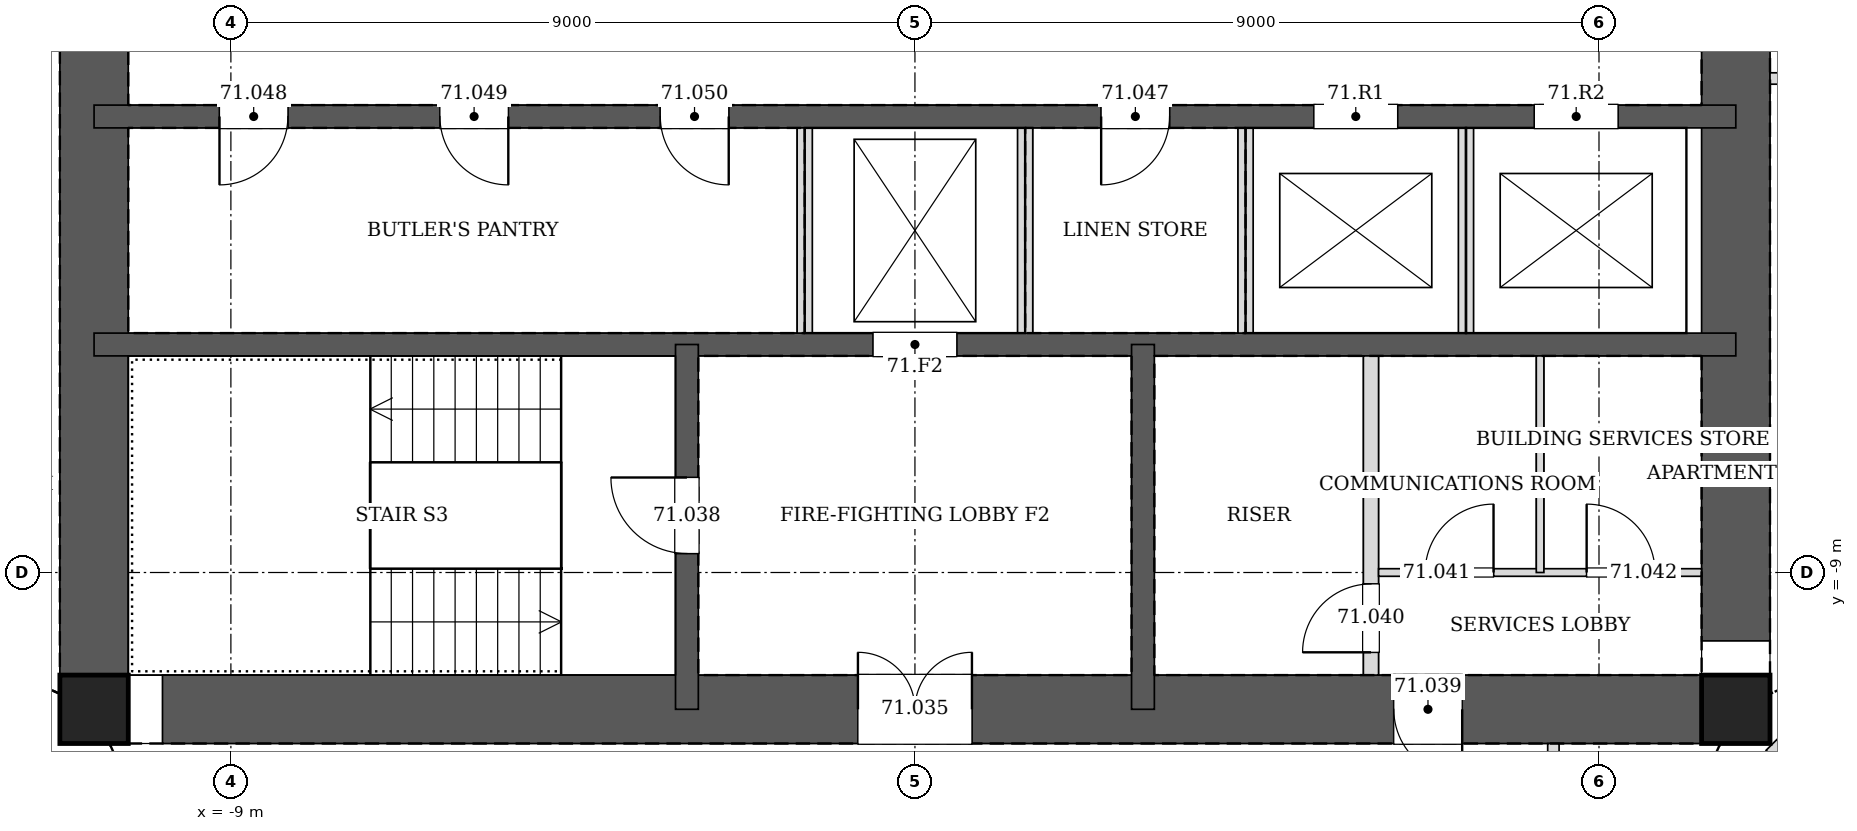
"""IFC4 building model, lengths in metres.
Left out: names, types, materials, properties, quantities, classifications, styles, units other than length and angle.
Written with IfcOpenShell. Run it as: python <this file> out.ifc"""

import sys

from ifc_helpers import new_model, si_unit, direction, frame, frame_2d, origin, origin_2d, place, context, subcontext, project, spatial, rectangle, hollow_rectangle, extrude, element, fill, save


model = new_model("IFC4")
c1 = context("Model", 3, precision=1e-05, world=origin(), true_north=direction((0.0, 1.0)))
c2 = subcontext(c1, "Body", "Model", "MODEL_VIEW")
j1 = project(units=[si_unit("LENGTHUNIT", "METRE"), si_unit("PLANEANGLEUNIT", "RADIAN")], contexts=[c1])
p1 = place(None, origin())
s1 = spatial("IfcSite", under=j1, at=p1, CompositionType="ELEMENT")
p2 = place(p1, origin())
s2 = spatial("IfcBuilding", under=s1, at=p2, CompositionType="ELEMENT")
p3 = place(p2, frame((0.0, 0.0, 291.2)))
s3 = spatial("IfcBuildingStorey", under=s2, at=p3, CompositionType="ELEMENT", Elevation=291.2)
for number, where, z_axis, x_axis in (
    (1, (-10.8, -10.8, 0.0), (0.0, 0.0, 1.0), (1.0, 0.0, 0.0)),
    (2, (10.8, -10.8, 0.0), (0.0, 0.0, 1.0), (1.0, 0.0, 0.0)),
):
    element("IfcColumn", number, at=place(p3, frame(where, z_axis=z_axis, x_axis=x_axis)), inside=s3, PredefinedType="COLUMN", context=c2, shape_type="SweptSolid", body=[
        extrude(hollow_rectangle(XDim=0.9, YDim=0.9, WallThickness=0.04, at=origin_2d()), origin(), (0.0, 0.0, 1.0), 3.4),
    ])
p4 = place(p3, frame((-10.8, -10.8, 0.0), z_axis=(0.0, 0.0, 1.0), x_axis=(1.0, 0.0, 0.0)))
e3 = element("IfcWall", 3, at=p4, inside=s3, PredefinedType="SOLIDWALL", context=c2, shape_type="SweptSolid", body=[
    extrude(rectangle(XDim=21.6, YDim=0.9, at=frame_2d((10.8, 0.0))), origin(), (0.0, 0.0, 1.0), 3.4),
])
p5 = place(p4, frame((10.05, 0.0, 0.0)))
e4 = element("IfcOpeningElement", 4, at=p5, cuts=e3, PredefinedType="OPENING", context=c2, shape_type="SweptSolid", body=[
    extrude(rectangle(XDim=1.5, YDim=2.1, at=frame_2d((0.75, 1.05))), frame((0.0, 0.46, 0.0), z_axis=(0.0, -1.0, 0.0), x_axis=(1.0, 0.0, 0.0)), (0.0, 0.0, 1.0), 0.92),
])
p6 = place(p4, frame((17.1, 0.0, 0.0)))
e5 = element("IfcOpeningElement", 5, at=p6, cuts=e3, PredefinedType="OPENING", context=c2, shape_type="SweptSolid", body=[
    extrude(rectangle(XDim=0.9, YDim=2.1, at=frame_2d((0.45, 1.05))), frame((0.0, 0.46, 0.0), z_axis=(0.0, -1.0, 0.0), x_axis=(1.0, 0.0, 0.0)), (0.0, 0.0, 1.0), 0.92),
])
p7 = place(p3, frame((10.8, -10.8, 0.0), z_axis=(0.0, 0.0, 1.0), x_axis=(0.0, 1.0, 0.0)))
e6 = element("IfcWall", 6, at=p7, inside=s3, PredefinedType="SOLIDWALL", context=c2, shape_type="SweptSolid", body=[
    extrude(rectangle(XDim=21.6, YDim=0.9, at=frame_2d((10.8, 0.0))), origin(), (0.0, 0.0, 1.0), 3.4),
])
p8 = place(p7, frame((11.7, 0.0, 0.0)))
e7 = element("IfcOpeningElement", 7, at=p8, cuts=e6, PredefinedType="OPENING", context=c2, shape_type="SweptSolid", body=[
    extrude(rectangle(XDim=1.2, YDim=2.1, at=frame_2d((0.6, 1.05))), frame((0.0, 0.46, 0.0), z_axis=(0.0, -1.0, 0.0), x_axis=(1.0, 0.0, 0.0)), (0.0, 0.0, 1.0), 0.92),
])
p9 = place(p7, frame((8.7, 0.0, 0.0)))
e8 = element("IfcOpeningElement", 8, at=p9, cuts=e6, PredefinedType="OPENING", context=c2, shape_type="SweptSolid", body=[
    extrude(rectangle(XDim=1.2, YDim=2.1, at=frame_2d((0.6, 1.05))), frame((0.0, 0.46, 0.0), z_axis=(0.0, -1.0, 0.0), x_axis=(1.0, 0.0, 0.0)), (0.0, 0.0, 1.0), 0.92),
])
p10 = place(p3, frame((-10.8, 10.8, 0.0), z_axis=(0.0, 0.0, 1.0), x_axis=(0.0, -1.0, 0.0)))
e9 = element("IfcWall", 9, at=p10, inside=s3, PredefinedType="SOLIDWALL", context=c2, shape_type="SweptSolid", body=[
    extrude(rectangle(XDim=21.6, YDim=0.9, at=frame_2d((10.8, 0.0))), origin(), (0.0, 0.0, 1.0), 3.4),
])
p11 = place(p10, frame((8.7, 0.0, 0.0)))
e10 = element("IfcOpeningElement", 10, at=p11, cuts=e9, PredefinedType="OPENING", context=c2, shape_type="SweptSolid", body=[
    extrude(rectangle(XDim=1.2, YDim=2.1, at=frame_2d((0.6, 1.05))), frame((0.0, 0.46, 0.0), z_axis=(0.0, -1.0, 0.0), x_axis=(1.0, 0.0, 0.0)), (0.0, 0.0, 1.0), 0.92),
])
p12 = place(p10, frame((11.7, 0.0, 0.0)))
e11 = element("IfcOpeningElement", 11, at=p12, cuts=e9, PredefinedType="OPENING", context=c2, shape_type="SweptSolid", body=[
    extrude(rectangle(XDim=1.2, YDim=2.1, at=frame_2d((0.6, 1.05))), frame((0.0, 0.46, 0.0), z_axis=(0.0, -1.0, 0.0), x_axis=(1.0, 0.0, 0.0)), (0.0, 0.0, 1.0), 0.92),
])
p13 = place(p3, frame((-10.8, -3.0, 0.0), z_axis=(0.0, 0.0, 1.0), x_axis=(1.0, 0.0, 0.0)))
e12 = element("IfcWall", 12, at=p13, inside=s3, PredefinedType="SOLIDWALL", context=c2, shape_type="SweptSolid", body=[
    extrude(rectangle(XDim=21.6, YDim=0.3, at=frame_2d((10.8, 0.0))), origin(), (0.0, 0.0, 1.0), 3.4),
])
p14 = place(p13, frame((13.25, 0.0, 0.0)))
e13 = element("IfcOpeningElement", 13, at=p14, cuts=e12, PredefinedType="OPENING", context=c2, shape_type="SweptSolid", body=[
    extrude(rectangle(XDim=0.9, YDim=2.1, at=frame_2d((0.45, 1.05))), frame((0.0, 0.16, 0.0), z_axis=(0.0, -1.0, 0.0), x_axis=(1.0, 0.0, 0.0)), (0.0, 0.0, 1.0), 0.32),
])
p15 = place(p13, frame((1.65, 0.0, 0.0)))
e14 = element("IfcOpeningElement", 14, at=p15, cuts=e12, PredefinedType="OPENING", context=c2, shape_type="SweptSolid", body=[
    extrude(rectangle(XDim=0.9, YDim=2.1, at=frame_2d((0.45, 1.05))), frame((0.0, 0.16, 0.0), z_axis=(0.0, -1.0, 0.0), x_axis=(1.0, 0.0, 0.0)), (0.0, 0.0, 1.0), 0.32),
])
p16 = place(p13, frame((4.55, 0.0, 0.0)))
e15 = element("IfcOpeningElement", 15, at=p16, cuts=e12, PredefinedType="OPENING", context=c2, shape_type="SweptSolid", body=[
    extrude(rectangle(XDim=0.9, YDim=2.1, at=frame_2d((0.45, 1.05))), frame((0.0, 0.16, 0.0), z_axis=(0.0, -1.0, 0.0), x_axis=(1.0, 0.0, 0.0)), (0.0, 0.0, 1.0), 0.32),
])
p17 = place(p13, frame((7.45, 0.0, 0.0)))
e16 = element("IfcOpeningElement", 16, at=p17, cuts=e12, PredefinedType="OPENING", context=c2, shape_type="SweptSolid", body=[
    extrude(rectangle(XDim=0.9, YDim=2.1, at=frame_2d((0.45, 1.05))), frame((0.0, 0.16, 0.0), z_axis=(0.0, -1.0, 0.0), x_axis=(1.0, 0.0, 0.0)), (0.0, 0.0, 1.0), 0.32),
])
p18 = place(p13, frame((16.05, 0.0, 0.0)))
e17 = element("IfcOpeningElement", 17, at=p18, cuts=e12, PredefinedType="OPENING", context=c2, shape_type="SweptSolid", body=[
    extrude(rectangle(XDim=1.1, YDim=2.1, at=frame_2d((0.55, 1.05))), frame((0.0, 0.16, 0.0), z_axis=(0.0, -1.0, 0.0), x_axis=(1.0, 0.0, 0.0)), (0.0, 0.0, 1.0), 0.32),
])
p19 = place(p13, frame((18.95, 0.0, 0.0)))
e18 = element("IfcOpeningElement", 18, at=p19, cuts=e12, PredefinedType="OPENING", context=c2, shape_type="SweptSolid", body=[
    extrude(rectangle(XDim=1.1, YDim=2.1, at=frame_2d((0.55, 1.05))), frame((0.0, 0.16, 0.0), z_axis=(0.0, -1.0, 0.0), x_axis=(1.0, 0.0, 0.0)), (0.0, 0.0, 1.0), 0.32),
])
p20 = place(p3, frame((-10.8, -6.0, 0.0), z_axis=(0.0, 0.0, 1.0), x_axis=(1.0, 0.0, 0.0)))
e19 = element("IfcWall", 19, at=p20, inside=s3, PredefinedType="SOLIDWALL", context=c2, shape_type="SweptSolid", body=[
    extrude(rectangle(XDim=21.6, YDim=0.3, at=frame_2d((10.8, 0.0))), origin(), (0.0, 0.0, 1.0), 3.4),
])
p21 = place(p20, frame((10.25, 0.0, 0.0)))
e20 = element("IfcOpeningElement", 20, at=p21, cuts=e19, PredefinedType="OPENING", context=c2, shape_type="SweptSolid", body=[
    extrude(rectangle(XDim=1.1, YDim=2.1, at=frame_2d((0.55, 1.05))), frame((0.0, 0.16, 0.0), z_axis=(0.0, -1.0, 0.0), x_axis=(1.0, 0.0, 0.0)), (0.0, 0.0, 1.0), 0.32),
])
p22 = place(p3, frame((-3.0, -6.0, 0.0), z_axis=(0.0, 0.0, 1.0), x_axis=(0.0, -1.0, 0.0)))
e21 = element("IfcWall", 21, at=p22, inside=s3, PredefinedType="SOLIDWALL", context=c2, shape_type="SweptSolid", body=[
    extrude(rectangle(XDim=4.8, YDim=0.3, at=frame_2d((2.4, 0.0))), origin(), (0.0, 0.0, 1.0), 3.4),
])
p23 = place(p22, frame((1.75, 0.0, 0.0)))
e22 = element("IfcOpeningElement", 22, at=p23, cuts=e21, PredefinedType="OPENING", context=c2, shape_type="SweptSolid", body=[
    extrude(rectangle(XDim=1.0, YDim=2.1, at=frame_2d((0.5, 1.05))), frame((0.0, 0.16, 0.0), z_axis=(0.0, -1.0, 0.0), x_axis=(1.0, 0.0, 0.0)), (0.0, 0.0, 1.0), 0.32),
])
p24 = place(p3, frame((3.0, -6.0, 0.0), z_axis=(0.0, 0.0, 1.0), x_axis=(0.0, -1.0, 0.0)))
e23 = element("IfcWall", 23, at=p24, inside=s3, PredefinedType="SOLIDWALL", context=c2, shape_type="SweptSolid", body=[
    extrude(rectangle(XDim=4.8, YDim=0.3, at=frame_2d((2.4, 0.0))), origin(), (0.0, 0.0, 1.0), 3.4),
])
p25 = place(p3, frame((11.25, -2.5, 0.0), z_axis=(0.0, 0.0, 1.0), x_axis=(1.0, 0.0, 0.0)))
e24 = element("IfcWall", 24, at=p25, inside=s3, PredefinedType="PARTITIONING", context=c2, shape_type="SweptSolid", body=[
    extrude(rectangle(XDim=1.65, YDim=0.15, at=frame_2d((0.825, 0.0))), origin(), (0.0, 0.0, 1.0), 3.2),
])
p26 = place(p25, frame((0.35, 0.0, 0.0)))
e25 = element("IfcOpeningElement", 25, at=p26, cuts=e24, PredefinedType="OPENING", context=c2, shape_type="SweptSolid", body=[
    extrude(rectangle(XDim=0.95, YDim=2.1, at=frame_2d((0.475, 1.05))), frame((0.0, 0.085, 0.0), z_axis=(0.0, -1.0, 0.0), x_axis=(1.0, 0.0, 0.0)), (0.0, 0.0, 1.0), 0.17),
])
p27 = place(p3, frame((8.4, -12.9, 0.0), z_axis=(0.0, 0.0, 1.0), x_axis=(0.0, 1.0, 0.0)))
e26 = element("IfcWall", 26, at=p27, inside=s3, PredefinedType="PARTITIONING", context=c2, shape_type="SweptSolid", body=[
    extrude(rectangle(XDim=1.65, YDim=0.15, at=frame_2d((0.825, 0.0))), origin(), (0.0, 0.0, 1.0), 3.2),
])
p28 = place(p3, frame((12.901, -12.901, 0.0), z_axis=(0.0, 0.0, 1.0), x_axis=(-0.707106781187, 0.707106781187, 0.0)))
e27 = element("IfcWall", 27, at=p28, inside=s3, PredefinedType="PARTITIONING", context=c2, shape_type="SweptSolid", body=[
    extrude(rectangle(XDim=2.308, YDim=0.2, at=frame_2d((1.154, 0.0))), origin(), (0.0, 0.0, 1.0), 2.591),
])
for number, where, z_axis, x_axis in (
    (28, (-1.45, -5.85, 0.0), (0.0, 0.0, 1.0), (0.0, 1.0, 0.0)),
    (29, (1.45, -5.85, 0.0), (0.0, 0.0, 1.0), (0.0, 1.0, 0.0)),
    (30, (4.35, -5.85, 0.0), (0.0, 0.0, 1.0), (0.0, 1.0, 0.0)),
):
    element("IfcWall", number, at=place(p3, frame(where, z_axis=z_axis, x_axis=x_axis)), inside=s3, PredefinedType="PARTITIONING", context=c2, shape_type="SweptSolid", body=[
        extrude(rectangle(XDim=2.7, YDim=0.2, at=frame_2d((1.35, 0.0))), origin(), (0.0, 0.0, 1.0), 3.2),
    ])
p29 = place(p3, frame((7.25, -5.85, 0.0), z_axis=(0.0, 0.0, 1.0), x_axis=(0.0, 1.0, 0.0)))
e31 = element("IfcWall", 31, at=p29, inside=s3, PredefinedType="PARTITIONING", context=c2, shape_type="SweptSolid", body=[
    extrude(rectangle(XDim=2.7, YDim=0.2, at=frame_2d((1.35, 0.0))), origin(), (0.0, 0.0, 1.0), 3.4),
])
p30 = place(p3, frame((6.0, -10.35, 0.0), z_axis=(0.0, 0.0, 1.0), x_axis=(0.0, 1.0, 0.0)))
e32 = element("IfcWall", 32, at=p30, inside=s3, PredefinedType="PARTITIONING", context=c2, shape_type="SweptSolid", body=[
    extrude(rectangle(XDim=4.2, YDim=0.2, at=frame_2d((2.1, 0.0))), origin(), (0.0, 0.0, 1.0), 3.2),
])
p31 = place(p30, frame((0.3, 0.0, 0.0)))
e33 = element("IfcOpeningElement", 33, at=p31, cuts=e32, PredefinedType="OPENING", context=c2, shape_type="SweptSolid", body=[
    extrude(rectangle(XDim=0.9, YDim=2.1, at=frame_2d((0.45, 1.05))), frame((0.0, 0.11, 0.0), z_axis=(0.0, -1.0, 0.0), x_axis=(1.0, 0.0, 0.0)), (0.0, 0.0, 1.0), 0.22),
])
p32 = place(p3, frame((6.1, -9.0, 0.0), z_axis=(0.0, 0.0, 1.0), x_axis=(1.0, 0.0, 0.0)))
e34 = element("IfcWall", 34, at=p32, inside=s3, PredefinedType="PARTITIONING", context=c2, shape_type="SweptSolid", body=[
    extrude(rectangle(XDim=4.25, YDim=0.1, at=frame_2d((2.125, 0.0))), origin(), (0.0, 0.0, 1.0), 3.2),
])
p33 = place(p32, frame((0.613, 0.0, 0.0)))
e35 = element("IfcOpeningElement", 35, at=p33, cuts=e34, PredefinedType="OPENING", context=c2, shape_type="SweptSolid", body=[
    extrude(rectangle(XDim=0.9, YDim=2.1, at=frame_2d((0.45, 1.05))), frame((0.0, 0.06, 0.0), z_axis=(0.0, -1.0, 0.0), x_axis=(1.0, 0.0, 0.0)), (0.0, 0.0, 1.0), 0.12),
])
p34 = place(p32, frame((2.738, 0.0, 0.0)))
e36 = element("IfcOpeningElement", 36, at=p34, cuts=e34, PredefinedType="OPENING", context=c2, shape_type="SweptSolid", body=[
    extrude(rectangle(XDim=0.9, YDim=2.1, at=frame_2d((0.45, 1.05))), frame((0.0, 0.06, 0.0), z_axis=(0.0, -1.0, 0.0), x_axis=(1.0, 0.0, 0.0)), (0.0, 0.0, 1.0), 0.12),
])
p35 = place(p3, frame((8.225, -9.0, 0.0), z_axis=(0.0, 0.0, 1.0), x_axis=(0.0, 1.0, 0.0)))
e37 = element("IfcWall", 37, at=p35, inside=s3, PredefinedType="PARTITIONING", context=c2, shape_type="SweptSolid", body=[
    extrude(rectangle(XDim=2.85, YDim=0.1, at=frame_2d((1.425, 0.0))), origin(), (0.0, 0.0, 1.0), 3.2),
])
p36 = place(p5, origin())
e38 = element("IfcDoor", 38, at=p36, inside=s3, OperationType="DOUBLE_DOOR_SINGLE_SWING", PredefinedType="DOOR", context=c2, shape_type="SweptSolid", body=[
    extrude(rectangle(XDim=1.5, YDim=2.1, at=frame_2d((0.75, 1.05))), frame((0.0, 0.025, 0.0), z_axis=(0.0, -1.0, 0.0), x_axis=(1.0, 0.0, 0.0)), (0.0, 0.0, 1.0), 0.05),
])
fill(e4, e38)
p37 = place(p23, frame((1.0, 0.0, 0.0), z_axis=(0.0, 0.0, 1.0), x_axis=(-1.0, 0.0, 0.0)))
e39 = element("IfcDoor", 39, at=p37, inside=s3, OperationType="SINGLE_SWING_RIGHT", PredefinedType="DOOR", context=c2, shape_type="SweptSolid", body=[
    extrude(rectangle(XDim=1.0, YDim=2.1, at=frame_2d((0.5, 1.05))), frame((0.0, 0.025, 0.0), z_axis=(0.0, -1.0, 0.0), x_axis=(1.0, 0.0, 0.0)), (0.0, 0.0, 1.0), 0.05),
])
fill(e22, e39)
p38 = place(p6, frame((0.9, 0.0, 0.0), z_axis=(0.0, 0.0, 1.0), x_axis=(-1.0, 0.0, 0.0)))
e40 = element("IfcDoor", 40, at=p38, inside=s3, OperationType="SINGLE_SWING_LEFT", PredefinedType="DOOR", context=c2, shape_type="SweptSolid", body=[
    extrude(rectangle(XDim=0.9, YDim=2.1, at=frame_2d((0.45, 1.05))), frame((0.0, 0.025, 0.0), z_axis=(0.0, -1.0, 0.0), x_axis=(1.0, 0.0, 0.0)), (0.0, 0.0, 1.0), 0.05),
])
fill(e5, e40)
p39 = place(p31, origin())
e41 = element("IfcDoor", 41, at=p39, inside=s3, OperationType="SINGLE_SWING_LEFT", PredefinedType="DOOR", context=c2, shape_type="SweptSolid", body=[
    extrude(rectangle(XDim=0.9, YDim=2.1, at=frame_2d((0.45, 1.05))), frame((0.0, 0.025, 0.0), z_axis=(0.0, -1.0, 0.0), x_axis=(1.0, 0.0, 0.0)), (0.0, 0.0, 1.0), 0.05),
])
fill(e33, e41)
p40 = place(p33, origin())
e42 = element("IfcDoor", 42, at=p40, inside=s3, OperationType="SINGLE_SWING_RIGHT", PredefinedType="DOOR", context=c2, shape_type="SweptSolid", body=[
    extrude(rectangle(XDim=0.9, YDim=2.1, at=frame_2d((0.45, 1.05))), frame((0.0, 0.025, 0.0), z_axis=(0.0, -1.0, 0.0), x_axis=(1.0, 0.0, 0.0)), (0.0, 0.0, 1.0), 0.05),
])
fill(e35, e42)
p41 = place(p34, origin())
e43 = element("IfcDoor", 43, at=p41, inside=s3, OperationType="SINGLE_SWING_LEFT", PredefinedType="DOOR", context=c2, shape_type="SweptSolid", body=[
    extrude(rectangle(XDim=0.9, YDim=2.1, at=frame_2d((0.45, 1.05))), frame((0.0, 0.025, 0.0), z_axis=(0.0, -1.0, 0.0), x_axis=(1.0, 0.0, 0.0)), (0.0, 0.0, 1.0), 0.05),
])
fill(e36, e43)
p42 = place(p14, frame((0.9, 0.0, 0.0), z_axis=(0.0, 0.0, 1.0), x_axis=(-1.0, 0.0, 0.0)))
e44 = element("IfcDoor", 44, at=p42, inside=s3, OperationType="SINGLE_SWING_RIGHT", PredefinedType="DOOR", context=c2, shape_type="SweptSolid", body=[
    extrude(rectangle(XDim=0.9, YDim=2.1, at=frame_2d((0.45, 1.05))), frame((0.0, 0.025, 0.0), z_axis=(0.0, -1.0, 0.0), x_axis=(1.0, 0.0, 0.0)), (0.0, 0.0, 1.0), 0.05),
])
fill(e13, e44)
p43 = place(p15, frame((0.9, 0.0, 0.0), z_axis=(0.0, 0.0, 1.0), x_axis=(-1.0, 0.0, 0.0)))
e45 = element("IfcDoor", 45, at=p43, inside=s3, OperationType="SINGLE_SWING_RIGHT", PredefinedType="DOOR", context=c2, shape_type="SweptSolid", body=[
    extrude(rectangle(XDim=0.9, YDim=2.1, at=frame_2d((0.45, 1.05))), frame((0.0, 0.025, 0.0), z_axis=(0.0, -1.0, 0.0), x_axis=(1.0, 0.0, 0.0)), (0.0, 0.0, 1.0), 0.05),
])
fill(e14, e45)
p44 = place(p16, frame((0.9, 0.0, 0.0), z_axis=(0.0, 0.0, 1.0), x_axis=(-1.0, 0.0, 0.0)))
e46 = element("IfcDoor", 46, at=p44, inside=s3, OperationType="SINGLE_SWING_LEFT", PredefinedType="DOOR", context=c2, shape_type="SweptSolid", body=[
    extrude(rectangle(XDim=0.9, YDim=2.1, at=frame_2d((0.45, 1.05))), frame((0.0, 0.025, 0.0), z_axis=(0.0, -1.0, 0.0), x_axis=(1.0, 0.0, 0.0)), (0.0, 0.0, 1.0), 0.05),
])
fill(e15, e46)
p45 = place(p17, frame((0.9, 0.0, 0.0), z_axis=(0.0, 0.0, 1.0), x_axis=(-1.0, 0.0, 0.0)))
e47 = element("IfcDoor", 47, at=p45, inside=s3, OperationType="SINGLE_SWING_LEFT", PredefinedType="DOOR", context=c2, shape_type="SweptSolid", body=[
    extrude(rectangle(XDim=0.9, YDim=2.1, at=frame_2d((0.45, 1.05))), frame((0.0, 0.025, 0.0), z_axis=(0.0, -1.0, 0.0), x_axis=(1.0, 0.0, 0.0)), (0.0, 0.0, 1.0), 0.05),
])
fill(e16, e47)
p46 = place(p21, origin())
e48 = element("IfcDoor", 48, at=p46, inside=s3, OperationType="DOUBLE_DOOR_SLIDING", PredefinedType="DOOR", context=c2, shape_type="SweptSolid", body=[
    extrude(rectangle(XDim=1.1, YDim=2.1, at=frame_2d((0.55, 1.05))), frame((0.0, 0.025, 0.0), z_axis=(0.0, -1.0, 0.0), x_axis=(1.0, 0.0, 0.0)), (0.0, 0.0, 1.0), 0.05),
])
fill(e20, e48)
p47 = place(p18, origin())
e49 = element("IfcDoor", 49, at=p47, inside=s3, OperationType="DOUBLE_DOOR_SLIDING", PredefinedType="DOOR", context=c2, shape_type="SweptSolid", body=[
    extrude(rectangle(XDim=1.1, YDim=2.1, at=frame_2d((0.55, 1.05))), frame((0.0, 0.025, 0.0), z_axis=(0.0, -1.0, 0.0), x_axis=(1.0, 0.0, 0.0)), (0.0, 0.0, 1.0), 0.05),
])
fill(e17, e49)
p48 = place(p19, origin())
e50 = element("IfcDoor", 50, at=p48, inside=s3, OperationType="DOUBLE_DOOR_SLIDING", PredefinedType="DOOR", context=c2, shape_type="SweptSolid", body=[
    extrude(rectangle(XDim=1.1, YDim=2.1, at=frame_2d((0.55, 1.05))), frame((0.0, 0.025, 0.0), z_axis=(0.0, -1.0, 0.0), x_axis=(1.0, 0.0, 0.0)), (0.0, 0.0, 1.0), 0.05),
])
fill(e18, e50)
save(model, sys.argv[1])
